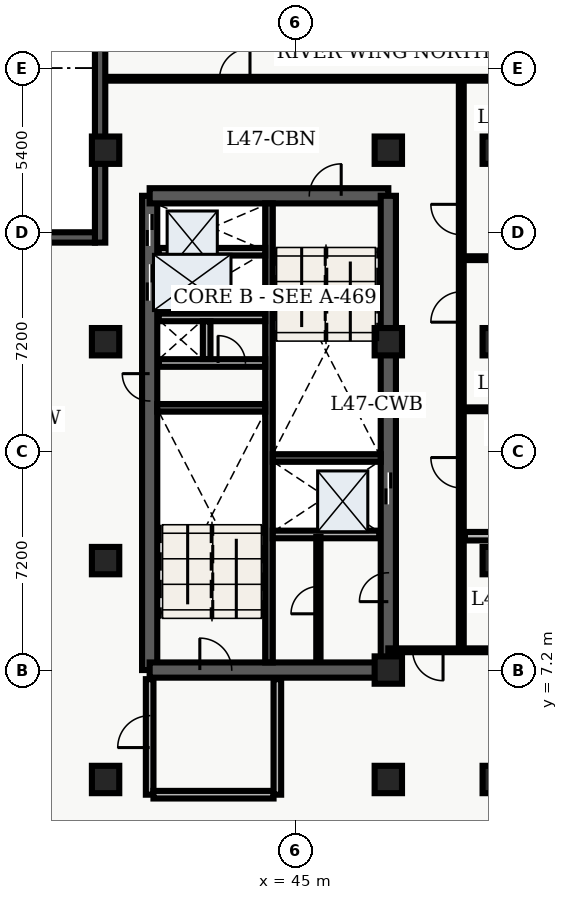
"""IFC4 building model, lengths in metres.
Left out: names, types, materials, properties, quantities, classifications, styles, units other than length and angle.
Written with IfcOpenShell. Run it as: python <this file> out.ifc"""

import sys

from ifc_helpers import new_model, entity, si_unit, converted_unit, direction, frame, origin_with_axes, origin_2d_with_axis, place, context, subcontext, project, spatial, polyline, rectangle, outline, extrude, element, fill, save


model = new_model("IFC4")
c1 = context("Model", 3, precision=1e-05, world=origin_with_axes(), true_north=direction((0.0, 1.0)))
c2 = subcontext(c1, "Body", "Model", "MODEL_VIEW")
j1 = project(units=[si_unit("LENGTHUNIT", "METRE"), converted_unit("PLANEANGLEUNIT", "DEGREE", entity("IfcPlaneAngleMeasure", 0.017), si_unit("PLANEANGLEUNIT", "RADIAN"), dimensions=[0, 0, 0, 0, 0, 0, 0])], contexts=[c1])
p1 = place(None, origin_with_axes())
s1 = spatial("IfcSite", under=j1, at=p1, CompositionType="ELEMENT")
p2 = place(p1, origin_with_axes())
s2 = spatial("IfcBuilding", under=s1, at=p2, CompositionType="ELEMENT")
p3 = place(p2, frame((0.0, 0.0, 192.6), z_axis=(0.0, 0.0, 1.0), x_axis=(1.0, 0.0, 0.0)))
s3 = spatial("IfcBuildingStorey", under=s2, at=p3, CompositionType="ELEMENT", Elevation=192.6)
p4 = place(p3, frame((40.2, 7.2, 0.0), z_axis=(0.0, 0.0, 1.0), x_axis=(0.0, 1.0, 0.0)))
e1 = element("IfcWall", 1, at=p4, inside=s3, PredefinedType="SHEAR", context=c2, shape_type="SweptSolid", body=[
    extrude(outline(polyline([(0.0, -0.25), (15.6, -0.25), (15.6, 0.25), (0.0, 0.25), (0.0, -0.25)])), origin_with_axes(), (0.0, 0.0, 1.0), 3.66),
])
p5 = place(p4, frame((14.475, 0.0, 0.0), z_axis=(0.0, 0.0, 1.0), x_axis=(1.0, 0.0, 0.0)))
e2 = element("IfcOpeningElement", 2, at=p5, cuts=e1, PredefinedType="OPENING", context=c2, shape_type="SweptSolid", body=[
    extrude(rectangle(XDim=1.05, YDim=0.52, at=origin_2d_with_axis()), origin_with_axes(), (0.0, 0.0, 1.0), 2.15),
])
p6 = place(p4, frame((12.75, 0.0, 0.0), z_axis=(0.0, 0.0, 1.0), x_axis=(1.0, 0.0, 0.0)))
e3 = element("IfcOpeningElement", 3, at=p6, cuts=e1, PredefinedType="OPENING", context=c2, shape_type="SweptSolid", body=[
    extrude(rectangle(XDim=1.2, YDim=0.52, at=origin_2d_with_axis()), origin_with_axes(), (0.0, 0.0, 1.0), 2.15),
])
p7 = place(p4, frame((9.3, 0.0, 0.0), z_axis=(0.0, 0.0, 1.0), x_axis=(1.0, 0.0, 0.0)))
e4 = element("IfcOpeningElement", 4, at=p7, cuts=e1, PredefinedType="OPENING", context=c2, shape_type="SweptSolid", body=[
    extrude(rectangle(XDim=0.9, YDim=0.52, at=origin_2d_with_axis()), origin_with_axes(), (0.0, 0.0, 1.0), 2.15),
])
p8 = place(p3, frame((40.2, 7.2, 0.0), z_axis=(0.0, 0.0, 1.0), x_axis=(1.0, 0.0, 0.0)))
e5 = element("IfcWall", 5, at=p8, inside=s3, PredefinedType="SHEAR", context=c2, shape_type="SweptSolid", body=[
    extrude(outline(polyline([(0.0, -0.25), (7.85, -0.25), (7.85, 0.25), (0.0, 0.25), (0.0, -0.25)])), origin_with_axes(), (0.0, 0.0, 1.0), 3.66),
])
p9 = place(p8, frame((2.175, 0.0, 0.0), z_axis=(0.0, 0.0, 1.0), x_axis=(1.0, 0.0, 0.0)))
e6 = element("IfcOpeningElement", 6, at=p9, cuts=e5, PredefinedType="OPENING", context=c2, shape_type="SweptSolid", body=[
    extrude(rectangle(XDim=1.05, YDim=0.52, at=origin_2d_with_axis()), origin_with_axes(), (0.0, 0.0, 1.0), 2.15),
])
p10 = place(p3, frame((40.2, 22.8, 0.0), z_axis=(0.0, 0.0, 1.0), x_axis=(1.0, 0.0, 0.0)))
e7 = element("IfcWall", 7, at=p10, inside=s3, PredefinedType="SHEAR", context=c2, shape_type="SweptSolid", body=[
    extrude(outline(polyline([(0.0, -0.25), (7.85, -0.25), (7.85, 0.25), (0.0, 0.25), (0.0, -0.25)])), origin_with_axes(), (0.0, 0.0, 1.0), 3.66),
])
p11 = place(p10, frame((5.775, 0.0, 0.0), z_axis=(0.0, 0.0, 1.0), x_axis=(1.0, 0.0, 0.0)))
e8 = element("IfcOpeningElement", 8, at=p11, cuts=e7, PredefinedType="OPENING", context=c2, shape_type="SweptSolid", body=[
    extrude(rectangle(XDim=1.05, YDim=0.52, at=origin_2d_with_axis()), origin_with_axes(), (0.0, 0.0, 1.0), 2.15),
])
p12 = place(p3, frame((48.05, 7.2, 0.0), z_axis=(0.0, 0.0, 1.0), x_axis=(0.0, 1.0, 0.0)))
e9 = element("IfcWall", 9, at=p12, inside=s3, PredefinedType="SHEAR", context=c2, shape_type="SweptSolid", body=[
    extrude(outline(polyline([(0.0, -0.25), (15.6, -0.25), (15.6, 0.25), (0.0, 0.25), (0.0, -0.25)])), origin_with_axes(), (0.0, 0.0, 1.0), 3.66),
])
p13 = place(p12, frame((5.975, 0.0, 0.0), z_axis=(0.0, 0.0, 1.0), x_axis=(1.0, 0.0, 0.0)))
e10 = element("IfcOpeningElement", 10, at=p13, cuts=e9, PredefinedType="OPENING", context=c2, shape_type="SweptSolid", body=[
    extrude(rectangle(XDim=1.05, YDim=0.52, at=origin_2d_with_axis()), origin_with_axes(), (0.0, 0.0, 1.0), 2.15),
])
p14 = place(p12, frame((2.725, 0.0, 0.0), z_axis=(0.0, 0.0, 1.0), x_axis=(1.0, 0.0, 0.0)))
e11 = element("IfcOpeningElement", 11, at=p14, cuts=e9, PredefinedType="OPENING", context=c2, shape_type="SweptSolid", body=[
    extrude(rectangle(XDim=0.95, YDim=0.52, at=origin_2d_with_axis()), origin_with_axes(), (0.0, 0.0, 1.0), 2.15),
])
p15 = place(p3, frame((44.125, 7.45, 0.0), z_axis=(0.0, 0.0, 1.0), x_axis=(0.0, 1.0, 0.0)))
e12 = element("IfcWall", 12, at=p15, inside=s3, PredefinedType="SHEAR", context=c2, shape_type="SweptSolid", body=[
    extrude(outline(polyline([(0.0, -0.125), (15.1, -0.125), (15.1, 0.125), (0.0, 0.125), (0.0, -0.125)])), origin_with_axes(), (0.0, 0.0, 1.0), 3.66),
])
for number, where, z_axis, x_axis in (
    (13, (40.45, 15.825, 0.0), (0.0, 0.0, 1.0), (1.0, 0.0, 0.0)),
    (14, (44.25, 14.175, 0.0), (0.0, 0.0, 1.0), (1.0, 0.0, 0.0)),
):
    element("IfcWall", number, at=place(p3, frame(where, z_axis=z_axis, x_axis=x_axis)), inside=s3, PredefinedType="SHEAR", context=c2, shape_type="SweptSolid", body=[
        extrude(outline(polyline([(0.0, -0.125), (3.55, -0.125), (3.55, 0.125), (0.0, 0.125), (0.0, -0.125)])), origin_with_axes(), (0.0, 0.0, 1.0), 3.66),
    ])
p16 = place(p3, frame((40.5, 17.3, 0.0), z_axis=(0.0, 0.0, 1.0), x_axis=(1.0, 0.0, 0.0)))
e15 = element("IfcWall", 15, at=p16, inside=s3, PredefinedType="SOLIDWALL", context=c2, shape_type="SweptSolid", body=[
    extrude(outline(polyline([(0.0, -0.125), (3.5, -0.125), (3.5, 0.125), (0.0, 0.125), (0.0, -0.125)])), origin_with_axes(), (0.0, 0.0, 1.0), 2.7),
])
p17 = place(p16, frame((2.4, 0.0, 0.0), z_axis=(0.0, 0.0, 1.0), x_axis=(1.0, 0.0, 0.0)))
e16 = element("IfcOpeningElement", 16, at=p17, cuts=e15, PredefinedType="OPENING", context=c2, shape_type="SweptSolid", body=[
    extrude(rectangle(XDim=0.9, YDim=0.27, at=origin_2d_with_axis()), origin_with_axes(), (0.0, 0.0, 1.0), 2.15),
])
p18 = place(p3, frame((40.5, 18.8, 0.0), z_axis=(0.0, 0.0, 1.0), x_axis=(1.0, 0.0, 0.0)))
e17 = element("IfcWall", 17, at=p18, inside=s3, PredefinedType="SOLIDWALL", context=c2, shape_type="SweptSolid", body=[
    extrude(outline(polyline([(0.0, -0.125), (3.5, -0.125), (3.5, 0.125), (0.0, 0.125), (0.0, -0.125)])), origin_with_axes(), (0.0, 0.0, 1.0), 2.7),
])
p19 = place(p3, frame((42.075, 17.43, 0.0), z_axis=(0.0, 0.0, 1.0), x_axis=(0.0, 1.0, 0.0)))
e18 = element("IfcWall", 18, at=p19, inside=s3, PredefinedType="SOLIDWALL", context=c2, shape_type="SweptSolid", body=[
    extrude(outline(polyline([(0.0, -0.125), (1.24, -0.125), (1.24, 0.125), (0.0, 0.125), (0.0, -0.125)])), origin_with_axes(), (0.0, 0.0, 1.0), 2.7),
])
p20 = place(p3, frame((40.2, 3.1, 0.0), z_axis=(0.0, 0.0, 1.0), x_axis=(0.0, 1.0, 0.0)))
e19 = element("IfcWall", 19, at=p20, inside=s3, PredefinedType="SOLIDWALL", context=c2, shape_type="SweptSolid", body=[
    extrude(outline(polyline([(0.0, -0.125), (3.8, -0.125), (3.8, 0.125), (0.0, 0.125), (0.0, -0.125)])), origin_with_axes(), (0.0, 0.0, 1.0), 2.7),
])
p21 = place(p20, frame((2.075, 0.0, 0.0), z_axis=(0.0, 0.0, 1.0), x_axis=(1.0, 0.0, 0.0)))
e20 = element("IfcOpeningElement", 20, at=p21, cuts=e19, PredefinedType="OPENING", context=c2, shape_type="SweptSolid", body=[
    extrude(rectangle(XDim=1.05, YDim=0.27, at=origin_2d_with_axis()), origin_with_axes(), (0.0, 0.0, 1.0), 2.15),
])
p22 = place(p3, frame((40.325, 3.1, 0.0), z_axis=(0.0, 0.0, 1.0), x_axis=(1.0, 0.0, 0.0)))
e21 = element("IfcWall", 21, at=p22, inside=s3, PredefinedType="SOLIDWALL", context=c2, shape_type="SweptSolid", body=[
    extrude(outline(polyline([(0.0, -0.125), (3.95, -0.125), (3.95, 0.125), (0.0, 0.125), (0.0, -0.125)])), origin_with_axes(), (0.0, 0.0, 1.0), 2.7),
])
p23 = place(p3, frame((44.4, 3.1, 0.0), z_axis=(0.0, 0.0, 1.0), x_axis=(0.0, 1.0, 0.0)))
e22 = element("IfcWall", 22, at=p23, inside=s3, PredefinedType="SOLIDWALL", context=c2, shape_type="SweptSolid", body=[
    extrude(outline(polyline([(0.0, -0.125), (3.8, -0.125), (3.8, 0.125), (0.0, 0.125), (0.0, -0.125)])), origin_with_axes(), (0.0, 0.0, 1.0), 2.7),
])
for number, where, z_axis, x_axis in (
    (23, (38.75, 3.6, 0.0), (0.0, 0.0, 1.0), (1.0, 0.0, 0.0)),
    (24, (38.75, 10.8, 0.0), (0.0, 0.0, 1.0), (1.0, 0.0, 0.0)),
    (25, (38.75, 18.0, 0.0), (0.0, 0.0, 1.0), (1.0, 0.0, 0.0)),
    (26, (38.75, 24.3, 0.0), (0.0, 0.0, 1.0), (1.0, 0.0, 0.0)),
    (27, (48.05, 3.6, 0.0), (0.0, 0.0, 1.0), (1.0, 0.0, 0.0)),
    (28, (48.05, 7.2, 0.0), (0.0, 0.0, 1.0), (1.0, 0.0, 0.0)),
    (29, (48.05, 18.0, 0.0), (0.0, 0.0, 1.0), (1.0, 0.0, 0.0)),
    (30, (48.05, 24.3, 0.0), (0.0, 0.0, 1.0), (1.0, 0.0, 0.0)),
    (31, (51.6, 3.6, 0.0), (0.0, 0.0, 1.0), (1.0, 0.0, 0.0)),
    (32, (51.6, 10.8, 0.0), (0.0, 0.0, 1.0), (1.0, 0.0, 0.0)),
    (33, (51.6, 18.0, 0.0), (0.0, 0.0, 1.0), (1.0, 0.0, 0.0)),
    (34, (51.6, 24.3, 0.0), (0.0, 0.0, 1.0), (1.0, 0.0, 0.0)),
):
    element("IfcColumn", number, at=place(p3, frame(where, z_axis=z_axis, x_axis=x_axis)), inside=s3, PredefinedType="COLUMN", context=c2, shape_type="SweptSolid", body=[
        extrude(rectangle(XDim=0.9, YDim=0.9, at=origin_2d_with_axis()), origin_with_axes(), (0.0, 0.0, 1.0), 3.9),
    ])
for number, where, z_axis, x_axis in (
    (35, (40.5, 20.96, 0.0), (0.0, 0.0, 1.0), (1.0, 0.0, 0.0)),
    (36, (44.25, 11.66, 0.0), (0.0, 0.0, 1.0), (1.0, 0.0, 0.0)),
):
    element("IfcWall", number, at=place(p3, frame(where, z_axis=z_axis, x_axis=x_axis)), inside=s3, PredefinedType="SOLIDWALL", context=c2, shape_type="SweptSolid", body=[
        extrude(outline(polyline([(0.0, -0.125), (3.5, -0.125), (3.5, 0.125), (0.0, 0.125), (0.0, -0.125)])), origin_with_axes(), (0.0, 0.0, 1.0), 2.7),
    ])
p24 = place(p3, frame((45.75, 7.5, 0.0), z_axis=(0.0, 0.0, 1.0), x_axis=(0.0, 1.0, 0.0)))
e37 = element("IfcWall", 37, at=p24, inside=s3, PredefinedType="PARTITIONING", context=c2, shape_type="SweptSolid", body=[
    extrude(outline(polyline([(0.0, -0.07), (4.08, -0.07), (4.08, 0.07), (0.0, 0.07), (0.0, -0.07)])), origin_with_axes(), (0.0, 0.0, 1.0), 2.7),
])
p25 = place(p24, frame((2.0, 0.0, 0.0), z_axis=(0.0, 0.0, 1.0), x_axis=(1.0, 0.0, 0.0)))
e38 = element("IfcOpeningElement", 38, at=p25, cuts=e37, PredefinedType="OPENING", context=c2, shape_type="SweptSolid", body=[
    extrude(rectangle(XDim=0.9, YDim=0.16, at=origin_2d_with_axis()), origin_with_axes(), (0.0, 0.0, 1.0), 2.15),
])
p26 = place(p3, frame((50.45, 7.85, 0.0), z_axis=(0.0, 0.0, 1.0), x_axis=(0.0, 1.0, 0.0)))
e39 = element("IfcWall", 39, at=p26, inside=s3, PredefinedType="PARTITIONING", context=c2, shape_type="SweptSolid", body=[
    extrude(outline(polyline([(0.0, -0.08), (18.8, -0.08), (18.8, 0.08), (0.0, 0.08), (0.0, -0.08)])), origin_with_axes(), (0.0, 0.0, 1.0), 2.7),
])
p27 = place(p26, frame((5.84, 0.0, 0.0), z_axis=(0.0, 0.0, 1.0), x_axis=(1.0, 0.0, 0.0)))
e40 = element("IfcOpeningElement", 40, at=p27, cuts=e39, PredefinedType="OPENING", context=c2, shape_type="SweptSolid", body=[
    extrude(rectangle(XDim=1.0, YDim=0.18, at=origin_2d_with_axis()), origin_with_axes(), (0.0, 0.0, 1.0), 2.15),
])
p28 = place(p26, frame((11.293, 0.0, 0.0), z_axis=(0.0, 0.0, 1.0), x_axis=(1.0, 0.0, 0.0)))
e41 = element("IfcOpeningElement", 41, at=p28, cuts=e39, PredefinedType="OPENING", context=c2, shape_type="SweptSolid", body=[
    extrude(rectangle(XDim=1.0, YDim=0.18, at=origin_2d_with_axis()), origin_with_axes(), (0.0, 0.0, 1.0), 2.15),
])
p29 = place(p26, frame((14.169, 0.0, 0.0), z_axis=(0.0, 0.0, 1.0), x_axis=(1.0, 0.0, 0.0)))
e42 = element("IfcOpeningElement", 42, at=p29, cuts=e39, PredefinedType="OPENING", context=c2, shape_type="SweptSolid", body=[
    extrude(rectangle(XDim=1.0, YDim=0.18, at=origin_2d_with_axis()), origin_with_axes(), (0.0, 0.0, 1.0), 2.15),
])
p30 = place(p3, frame((59.665, 7.85, 0.0), z_axis=(0.0, 0.0, 1.0), x_axis=(-1.0, 0.0, 0.0)))
e43 = element("IfcWall", 43, at=p30, inside=s3, PredefinedType="PARTITIONING", context=c2, shape_type="SweptSolid", body=[
    extrude(outline(polyline([(0.0, -0.062), (11.615, -0.062), (11.615, 0.062), (0.0, 0.062), (0.0, -0.062)])), origin_with_axes(), (0.0, 0.0, 1.0), 2.7),
])
p31 = place(p30, frame((10.315, 0.0, 0.0), z_axis=(0.0, 0.0, 1.0), x_axis=(1.0, 0.0, 0.0)))
e44 = element("IfcOpeningElement", 44, at=p31, cuts=e43, PredefinedType="OPENING", context=c2, shape_type="SweptSolid", body=[
    extrude(rectangle(XDim=1.0, YDim=0.145, at=origin_2d_with_axis()), origin_with_axes(), (0.0, 0.0, 1.0), 2.15),
])
p32 = place(p3, frame((38.735, 26.65, 0.0), z_axis=(0.0, 0.0, 1.0), x_axis=(1.0, 0.0, 0.0)))
e45 = element("IfcWall", 45, at=p32, inside=s3, PredefinedType="PARTITIONING", context=c2, shape_type="SweptSolid", body=[
    extrude(outline(polyline([(0.0, -0.062), (20.905, -0.062), (20.905, 0.062), (0.0, 0.062), (0.0, -0.062)])), origin_with_axes(), (0.0, 0.0, 1.0), 2.7),
])
p33 = place(p32, frame((4.265, 0.0, 0.0), z_axis=(0.0, 0.0, 1.0), x_axis=(1.0, 0.0, 0.0)))
e46 = element("IfcOpeningElement", 46, at=p33, cuts=e45, PredefinedType="OPENING", context=c2, shape_type="SweptSolid", body=[
    extrude(rectangle(XDim=1.0, YDim=0.145, at=origin_2d_with_axis()), origin_with_axes(), (0.0, 0.0, 1.0), 2.15),
])
p34 = place(p3, frame((50.57, 11.603, 0.0), z_axis=(0.0, 0.0, 1.0), x_axis=(1.0, 0.0, 0.0)))
e47 = element("IfcWall", 47, at=p34, inside=s3, PredefinedType="PARTITIONING", context=c2, shape_type="SweptSolid", body=[
    extrude(outline(polyline([(0.0, -0.14), (9.095, -0.14), (9.095, 0.14), (0.0, 0.14), (0.0, -0.14)])), origin_with_axes(), (0.0, 0.0, 1.0), 2.7),
])
p35 = place(p34, frame((2.365, 0.0, 0.0), z_axis=(0.0, 0.0, 1.0), x_axis=(1.0, 0.0, 0.0)))
e48 = element("IfcOpeningElement", 48, at=p35, cuts=e47, PredefinedType="OPENING", context=c2, shape_type="SweptSolid", body=[
    extrude(rectangle(XDim=0.95, YDim=0.3, at=origin_2d_with_axis()), origin_with_axes(), (0.0, 0.0, 1.0), 2.15),
])
for number, where, z_axis, x_axis in (
    (49, (50.57, 15.777, 0.0), (0.0, 0.0, 1.0), (1.0, 0.0, 0.0)),
    (50, (50.57, 20.748, 0.0), (0.0, 0.0, 1.0), (1.0, 0.0, 0.0)),
):
    element("IfcWall", number, at=place(p3, frame(where, z_axis=z_axis, x_axis=x_axis)), inside=s3, PredefinedType="PARTITIONING", context=c2, shape_type="SweptSolid", body=[
        extrude(outline(polyline([(0.0, -0.062), (9.095, -0.062), (9.095, 0.062), (0.0, 0.062), (0.0, -0.062)])), origin_with_axes(), (0.0, 0.0, 1.0), 2.7),
    ])
p36 = place(p3, frame((38.57, 21.26, 0.0), z_axis=(0.0, 0.0, 1.0), x_axis=(0.0, 1.0, 0.0)))
e51 = element("IfcWall", 51, at=p36, inside=s3, PredefinedType="SOLIDWALL", context=c2, shape_type="SweptSolid", body=[
    extrude(outline(polyline([(0.0, -0.17), (7.54, -0.17), (7.54, 0.17), (0.0, 0.17), (0.0, -0.17)])), origin_with_axes(), (0.0, 0.0, 1.0), 3.66),
])
p37 = place(p3, frame((27.341, 21.43, 0.0), z_axis=(0.0, 0.0, 1.0), x_axis=(1.0, 0.0, 0.0)))
e52 = element("IfcWall", 52, at=p37, inside=s3, PredefinedType="SOLIDWALL", context=c2, shape_type="SweptSolid", body=[
    extrude(outline(polyline([(0.0, -0.17), (11.059, -0.17), (11.059, 0.17), (0.0, 0.17), (0.0, -0.17)])), origin_with_axes(), (0.0, 0.0, 1.0), 3.66),
])
p38 = place(p37, frame((3.065, 0.0, 0.45), z_axis=(0.0, 0.0, 1.0), x_axis=(1.0, 0.0, 0.0)))
e53 = element("IfcOpeningElement", 53, at=p38, cuts=e52, PredefinedType="OPENING", context=c2, shape_type="SweptSolid", body=[
    extrude(rectangle(XDim=1.8, YDim=0.36, at=origin_2d_with_axis()), origin_with_axes(), (0.0, 0.0, 1.0), 2.1),
])
p39 = place(p37, frame((7.544, 0.0, 0.45), z_axis=(0.0, 0.0, 1.0), x_axis=(1.0, 0.0, 0.0)))
e54 = element("IfcOpeningElement", 54, at=p39, cuts=e52, PredefinedType="OPENING", context=c2, shape_type="SweptSolid", body=[
    extrude(rectangle(XDim=1.8, YDim=0.36, at=origin_2d_with_axis()), origin_with_axes(), (0.0, 0.0, 1.0), 2.1),
])
p40 = place(p12, frame((5.975, 0.0, 0.0), z_axis=(0.0, 0.0, 1.0), x_axis=(1.0, 0.0, 0.0)))
e55 = element("IfcDoor", 55, at=p40, inside=s3, OperationType="SLIDING_TO_LEFT", PredefinedType="DOOR", context=c2, shape_type="SweptSolid", body=[
    extrude(rectangle(XDim=1.05, YDim=0.09, at=origin_2d_with_axis()), origin_with_axes(), (0.0, 0.0, 1.0), 2.15),
])
fill(e10, e55)
p41 = place(p4, frame((14.475, 0.0, 0.0), z_axis=(0.0, 0.0, 1.0), x_axis=(1.0, 0.0, 0.0)))
e56 = element("IfcDoor", 56, at=p41, inside=s3, OperationType="SLIDING_TO_RIGHT", PredefinedType="DOOR", context=c2, shape_type="SweptSolid", body=[
    extrude(rectangle(XDim=1.05, YDim=0.09, at=origin_2d_with_axis()), origin_with_axes(), (0.0, 0.0, 1.0), 2.15),
])
fill(e2, e56)
p42 = place(p4, frame((12.75, 0.0, 0.0), z_axis=(0.0, 0.0, 1.0), x_axis=(1.0, 0.0, 0.0)))
e57 = element("IfcDoor", 57, at=p42, inside=s3, OperationType="DOUBLE_DOOR_SLIDING", PredefinedType="DOOR", context=c2, shape_type="SweptSolid", body=[
    extrude(rectangle(XDim=1.2, YDim=0.09, at=origin_2d_with_axis()), origin_with_axes(), (0.0, 0.0, 1.0), 2.15),
])
fill(e3, e57)
p43 = place(p4, frame((9.3, 0.0, 0.0), z_axis=(0.0, 0.0, 1.0), x_axis=(1.0, 0.0, 0.0)))
e58 = element("IfcDoor", 58, at=p43, inside=s3, OperationType="SINGLE_SWING_RIGHT", PredefinedType="DOOR", context=c2, shape_type="SweptSolid", body=[
    extrude(rectangle(XDim=0.9, YDim=0.09, at=origin_2d_with_axis()), origin_with_axes(), (0.0, 0.0, 1.0), 2.15),
])
fill(e4, e58)
p44 = place(p16, frame((2.4, 0.0, 0.0), z_axis=(0.0, 0.0, 1.0), x_axis=(1.0, 0.0, 0.0)))
e59 = element("IfcDoor", 59, at=p44, inside=s3, OperationType="SINGLE_SWING_LEFT", PredefinedType="DOOR", context=c2, shape_type="SweptSolid", body=[
    extrude(rectangle(XDim=0.9, YDim=0.09, at=origin_2d_with_axis()), origin_with_axes(), (0.0, 0.0, 1.0), 2.15),
])
fill(e16, e59)
p45 = place(p8, frame((2.175, 0.0, 0.0), z_axis=(0.0, 0.0, 1.0), x_axis=(1.0, 0.0, 0.0)))
e60 = element("IfcDoor", 60, at=p45, inside=s3, OperationType="SINGLE_SWING_LEFT", PredefinedType="DOOR", context=c2, shape_type="SweptSolid", body=[
    extrude(rectangle(XDim=1.05, YDim=0.09, at=origin_2d_with_axis()), origin_with_axes(), (0.0, 0.0, 1.0), 2.15),
])
fill(e6, e60)
p46 = place(p10, frame((5.775, 0.0, 0.0), z_axis=(0.0, 0.0, 1.0), x_axis=(1.0, 0.0, 0.0)))
e61 = element("IfcDoor", 61, at=p46, inside=s3, OperationType="SINGLE_SWING_RIGHT", PredefinedType="DOOR", context=c2, shape_type="SweptSolid", body=[
    extrude(rectangle(XDim=1.05, YDim=0.09, at=origin_2d_with_axis()), origin_with_axes(), (0.0, 0.0, 1.0), 2.15),
])
fill(e8, e61)
p47 = place(p20, frame((2.075, 0.0, 0.0), z_axis=(0.0, 0.0, 1.0), x_axis=(1.0, 0.0, 0.0)))
e62 = element("IfcDoor", 62, at=p47, inside=s3, OperationType="SINGLE_SWING_LEFT", PredefinedType="DOOR", context=c2, shape_type="SweptSolid", body=[
    extrude(rectangle(XDim=1.05, YDim=0.09, at=origin_2d_with_axis()), origin_with_axes(), (0.0, 0.0, 1.0), 2.15),
])
fill(e20, e62)
p48 = place(p24, frame((2.0, 0.0, 0.0), z_axis=(0.0, 0.0, 1.0), x_axis=(1.0, 0.0, 0.0)))
e63 = element("IfcDoor", 63, at=p48, inside=s3, OperationType="SINGLE_SWING_LEFT", PredefinedType="DOOR", context=c2, shape_type="SweptSolid", body=[
    extrude(rectangle(XDim=0.9, YDim=0.084, at=origin_2d_with_axis()), origin_with_axes(), (0.0, 0.0, 1.0), 2.15),
])
fill(e38, e63)
p49 = place(p12, frame((2.725, 0.0, 0.0), z_axis=(0.0, 0.0, 1.0), x_axis=(1.0, 0.0, 0.0)))
e64 = element("IfcDoor", 64, at=p49, inside=s3, OperationType="SINGLE_SWING_LEFT", PredefinedType="DOOR", context=c2, shape_type="SweptSolid", body=[
    extrude(rectangle(XDim=0.95, YDim=0.09, at=origin_2d_with_axis()), origin_with_axes(), (0.0, 0.0, 1.0), 2.15),
])
fill(e11, e64)
p50 = place(p30, frame((10.315, 0.0, 0.0), z_axis=(0.0, 0.0, 1.0), x_axis=(1.0, 0.0, 0.0)))
e65 = element("IfcDoor", 65, at=p50, inside=s3, OperationType="SINGLE_SWING_LEFT", PredefinedType="DOOR", context=c2, shape_type="SweptSolid", body=[
    extrude(rectangle(XDim=1.0, YDim=0.075, at=origin_2d_with_axis()), origin_with_axes(), (0.0, 0.0, 1.0), 2.15),
])
fill(e44, e65)
p51 = place(p32, frame((4.265, 0.0, 0.0), z_axis=(0.0, 0.0, 1.0), x_axis=(1.0, 0.0, 0.0)))
e66 = element("IfcDoor", 66, at=p51, inside=s3, OperationType="SINGLE_SWING_RIGHT", PredefinedType="DOOR", context=c2, shape_type="SweptSolid", body=[
    extrude(rectangle(XDim=1.0, YDim=0.075, at=origin_2d_with_axis()), origin_with_axes(), (0.0, 0.0, 1.0), 2.15),
])
fill(e46, e66)
p52 = place(p26, frame((5.84, 0.0, 0.0), z_axis=(0.0, 0.0, 1.0), x_axis=(1.0, 0.0, 0.0)))
e67 = element("IfcDoor", 67, at=p52, inside=s3, OperationType="SINGLE_SWING_RIGHT", PredefinedType="DOOR", context=c2, shape_type="SweptSolid", body=[
    extrude(rectangle(XDim=1.0, YDim=0.09, at=origin_2d_with_axis()), origin_with_axes(), (0.0, 0.0, 1.0), 2.15),
])
fill(e40, e67)
p53 = place(p26, frame((11.293, 0.0, 0.0), z_axis=(0.0, 0.0, 1.0), x_axis=(1.0, 0.0, 0.0)))
e68 = element("IfcDoor", 68, at=p53, inside=s3, OperationType="SINGLE_SWING_LEFT", PredefinedType="DOOR", context=c2, shape_type="SweptSolid", body=[
    extrude(rectangle(XDim=1.0, YDim=0.09, at=origin_2d_with_axis()), origin_with_axes(), (0.0, 0.0, 1.0), 2.15),
])
fill(e41, e68)
p54 = place(p26, frame((14.169, 0.0, 0.0), z_axis=(0.0, 0.0, 1.0), x_axis=(1.0, 0.0, 0.0)))
e69 = element("IfcDoor", 69, at=p54, inside=s3, OperationType="SINGLE_SWING_RIGHT", PredefinedType="DOOR", context=c2, shape_type="SweptSolid", body=[
    extrude(rectangle(XDim=1.0, YDim=0.09, at=origin_2d_with_axis()), origin_with_axes(), (0.0, 0.0, 1.0), 2.15),
])
fill(e42, e69)
save(model, sys.argv[1])
